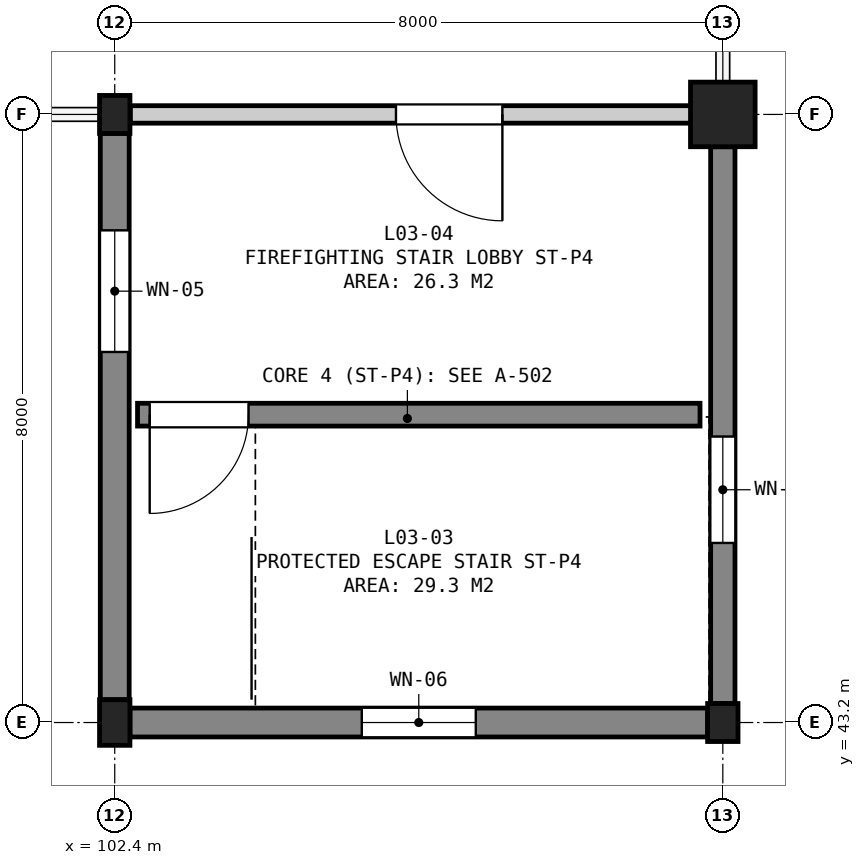
"""IFC4 building model, lengths in metres.
Left out: names, types, materials, properties, quantities, classifications, styles, units other than length and angle.
Written with IfcOpenShell. Run it as: python <this file> out.ifc"""

import sys

from ifc_helpers import new_model, si_unit, direction, frame, frame_2d, origin, origin_2d, place, context, subcontext, project, spatial, rectangle, extrude, element, fill, save


model = new_model("IFC4")
c1 = context("Model", 3, precision=1e-05, world=origin(), true_north=direction((0.0, 1.0)))
c2 = subcontext(c1, "Body", "Model", "MODEL_VIEW")
j1 = project(units=[si_unit("LENGTHUNIT", "METRE"), si_unit("PLANEANGLEUNIT", "RADIAN")], contexts=[c1])
p1 = place(None, origin())
s1 = spatial("IfcSite", under=j1, at=p1, CompositionType="ELEMENT")
p2 = place(p1, origin())
s2 = spatial("IfcBuilding", under=s1, at=p2, CompositionType="ELEMENT")
p3 = place(p2, frame((0.0, 0.0, 15.6)))
s3 = spatial("IfcBuildingStorey", under=s2, at=p3, CompositionType="ELEMENT", Elevation=15.6)
p4 = place(p3, frame((102.4, 43.2, 0.0), z_axis=(0.0, 0.0, 1.0), x_axis=(1.0, 0.0, 0.0)))
e1 = element("IfcColumn", 1, at=p4, inside=s3, PredefinedType="COLUMN", context=c2, shape_type="SweptSolid", body=[
    extrude(rectangle(XDim=0.4, YDim=0.6, at=origin_2d()), origin(), (0.0, 0.0, 1.0), 4.2),
])
for number, where, z_axis, x_axis in (
    (2, (102.4, 51.2, 0.0), (0.0, 0.0, 1.0), (1.0, 0.0, 0.0)),
    (3, (110.4, 43.2, 0.0), (0.0, 0.0, 1.0), (1.0, 0.0, 0.0)),
):
    element("IfcColumn", number, at=place(p3, frame(where, z_axis=z_axis, x_axis=x_axis)), inside=s3, PredefinedType="COLUMN", context=c2, shape_type="SweptSolid", body=[
        extrude(rectangle(XDim=0.4, YDim=0.5, at=origin_2d()), origin(), (0.0, 0.0, 1.0), 4.2),
    ])
p5 = place(p3, frame((110.4, 51.2, 0.0), z_axis=(0.0, 0.0, 1.0), x_axis=(1.0, 0.0, 0.0)))
e4 = element("IfcColumn", 4, at=p5, inside=s3, PredefinedType="COLUMN", context=c2, shape_type="SweptSolid", body=[
    extrude(rectangle(XDim=0.85, YDim=0.85, at=origin_2d()), origin(), (0.0, 0.0, 1.0), 4.2),
])
p6 = place(p3, frame((102.4, 50.95, 0.0), z_axis=(0.0, 0.0, 1.0), x_axis=(0.0, -1.0, 0.0)))
e5 = element("IfcWall", 5, at=p6, inside=s3, PredefinedType="SOLIDWALL", context=c2, shape_type="SweptSolid", body=[
    extrude(rectangle(XDim=7.45, YDim=0.38, at=frame_2d((3.725, 0.0))), origin(), (0.0, 0.0, 1.0), 3.335),
])
p7 = place(p6, frame((1.275, 0.0, 0.9)))
e6 = element("IfcOpeningElement", 6, at=p7, cuts=e5, PredefinedType="OPENING", context=c2, shape_type="SweptSolid", body=[
    extrude(rectangle(XDim=1.6, YDim=1.95, at=frame_2d((0.8, 0.975))), frame((0.0, 0.202, 0.0), z_axis=(0.0, -1.0, 0.0), x_axis=(1.0, 0.0, 0.0)), (0.0, 0.0, 1.0), 0.404),
])
p8 = place(p3, frame((102.6, 43.2, 0.0), z_axis=(0.0, 0.0, 1.0), x_axis=(1.0, 0.0, 0.0)))
e7 = element("IfcWall", 7, at=p8, inside=s3, PredefinedType="SOLIDWALL", context=c2, shape_type="SweptSolid", body=[
    extrude(rectangle(XDim=7.6, YDim=0.38, at=frame_2d((3.8, 0.0))), origin(), (0.0, 0.0, 1.0), 3.335),
])
p9 = place(p8, frame((3.05, 0.0, 0.9)))
e8 = element("IfcOpeningElement", 8, at=p9, cuts=e7, PredefinedType="OPENING", context=c2, shape_type="SweptSolid", body=[
    extrude(rectangle(XDim=1.5, YDim=1.85, at=frame_2d((0.75, 0.925))), frame((0.0, 0.202, 0.0), z_axis=(0.0, -1.0, 0.0), x_axis=(1.0, 0.0, 0.0)), (0.0, 0.0, 1.0), 0.404),
])
p10 = place(p3, frame((110.4, 43.45, 0.0), z_axis=(0.0, 0.0, 1.0), x_axis=(0.0, 1.0, 0.0)))
e9 = element("IfcWall", 9, at=p10, inside=s3, PredefinedType="SOLIDWALL", context=c2, shape_type="SweptSolid", body=[
    extrude(rectangle(XDim=7.325, YDim=0.32, at=frame_2d((3.663, 0.0))), origin(), (0.0, 0.0, 1.0), 3.375),
])
p11 = place(p10, frame((2.113, 0.0, 0.9)))
e10 = element("IfcOpeningElement", 10, at=p11, cuts=e9, PredefinedType="OPENING", context=c2, shape_type="SweptSolid", body=[
    extrude(rectangle(XDim=1.4, YDim=1.8, at=frame_2d((0.7, 0.9))), frame((0.0, 0.172, 0.0), z_axis=(0.0, -1.0, 0.0), x_axis=(1.0, 0.0, 0.0)), (0.0, 0.0, 1.0), 0.344),
])
p12 = place(p3, frame((102.7, 47.25, 0.0), z_axis=(0.0, 0.0, 1.0), x_axis=(1.0, 0.0, 0.0)))
e11 = element("IfcWall", 11, at=p12, inside=s3, PredefinedType="SHEAR", context=c2, shape_type="SweptSolid", body=[
    extrude(rectangle(XDim=7.4, YDim=0.3, at=frame_2d((3.7, 0.0))), origin(), (0.0, 0.0, 1.0), 3.9),
])
p13 = place(p12, frame((0.16, 0.0, 0.0)))
e12 = element("IfcOpeningElement", 12, at=p13, cuts=e11, PredefinedType="OPENING", context=c2, shape_type="SweptSolid", body=[
    extrude(rectangle(XDim=1.3, YDim=2.18, at=frame_2d((0.65, 1.09))), frame((0.0, 0.162, 0.0), z_axis=(0.0, -1.0, 0.0), x_axis=(1.0, 0.0, 0.0)), (0.0, 0.0, 1.0), 0.324),
])
p14 = place(p3, frame((102.605, 51.2, 0.0), z_axis=(0.0, 0.0, 1.0), x_axis=(1.0, 0.0, 0.0)))
e13 = element("IfcWall", 13, at=p14, inside=s3, PredefinedType="SOLIDWALL", context=c2, shape_type="SweptSolid", body=[
    extrude(rectangle(XDim=7.69, YDim=0.23, at=frame_2d((3.845, 0.0))), origin(), (0.0, 0.0, 1.0), 3.195),
])
p15 = place(p14, frame((3.495, 0.0, 0.0)))
e14 = element("IfcOpeningElement", 14, at=p15, cuts=e13, PredefinedType="OPENING", context=c2, shape_type="SweptSolid", body=[
    extrude(rectangle(XDim=1.4, YDim=2.2, at=frame_2d((0.7, 1.1))), frame((0.0, 0.127, 0.0), z_axis=(0.0, -1.0, 0.0), x_axis=(1.0, 0.0, 0.0)), (0.0, 0.0, 1.0), 0.254),
])
p16 = place(p7, origin())
e15 = element("IfcWindow", 15, at=p16, inside=s3, PartitioningType="DOUBLE_PANEL_VERTICAL", PredefinedType="WINDOW", context=c2, shape_type="SweptSolid", body=[
    extrude(rectangle(XDim=1.6, YDim=1.95, at=frame_2d((0.8, 0.975))), frame((0.0, 0.03, 0.0), z_axis=(0.0, -1.0, 0.0), x_axis=(1.0, 0.0, 0.0)), (0.0, 0.0, 1.0), 0.06),
])
fill(e6, e15)
p17 = place(p9, origin())
e16 = element("IfcWindow", 16, at=p17, inside=s3, PartitioningType="SINGLE_PANEL", PredefinedType="WINDOW", context=c2, shape_type="SweptSolid", body=[
    extrude(rectangle(XDim=1.5, YDim=1.85, at=frame_2d((0.75, 0.925))), frame((0.0, 0.03, 0.0), z_axis=(0.0, -1.0, 0.0), x_axis=(1.0, 0.0, 0.0)), (0.0, 0.0, 1.0), 0.06),
])
fill(e8, e16)
p18 = place(p11, origin())
e17 = element("IfcWindow", 17, at=p18, inside=s3, PartitioningType="SINGLE_PANEL", PredefinedType="WINDOW", context=c2, shape_type="SweptSolid", body=[
    extrude(rectangle(XDim=1.4, YDim=1.8, at=frame_2d((0.7, 0.9))), frame((0.0, 0.03, 0.0), z_axis=(0.0, -1.0, 0.0), x_axis=(1.0, 0.0, 0.0)), (0.0, 0.0, 1.0), 0.06),
])
fill(e10, e17)
p19 = place(p13, frame((1.3, 0.0, 0.0), z_axis=(0.0, 0.0, 1.0), x_axis=(-1.0, 0.0, 0.0)))
e18 = element("IfcDoor", 18, at=p19, inside=s3, OperationType="SINGLE_SWING_RIGHT", PredefinedType="DOOR", context=c2, shape_type="SweptSolid", body=[
    extrude(rectangle(XDim=1.3, YDim=2.18, at=frame_2d((0.65, 1.09))), frame((0.0, 0.025, 0.0), z_axis=(0.0, -1.0, 0.0), x_axis=(1.0, 0.0, 0.0)), (0.0, 0.0, 1.0), 0.05),
])
fill(e12, e18)
p20 = place(p15, frame((1.4, 0.0, 0.0), z_axis=(0.0, 0.0, 1.0), x_axis=(-1.0, 0.0, 0.0)))
e19 = element("IfcDoor", 19, at=p20, inside=s3, OperationType="SINGLE_SWING_LEFT", PredefinedType="DOOR", context=c2, shape_type="SweptSolid", body=[
    extrude(rectangle(XDim=1.4, YDim=2.2, at=frame_2d((0.7, 1.1))), frame((0.0, 0.025, 0.0), z_axis=(0.0, -1.0, 0.0), x_axis=(1.0, 0.0, 0.0)), (0.0, 0.0, 1.0), 0.05),
])
fill(e14, e19)
save(model, sys.argv[1])
